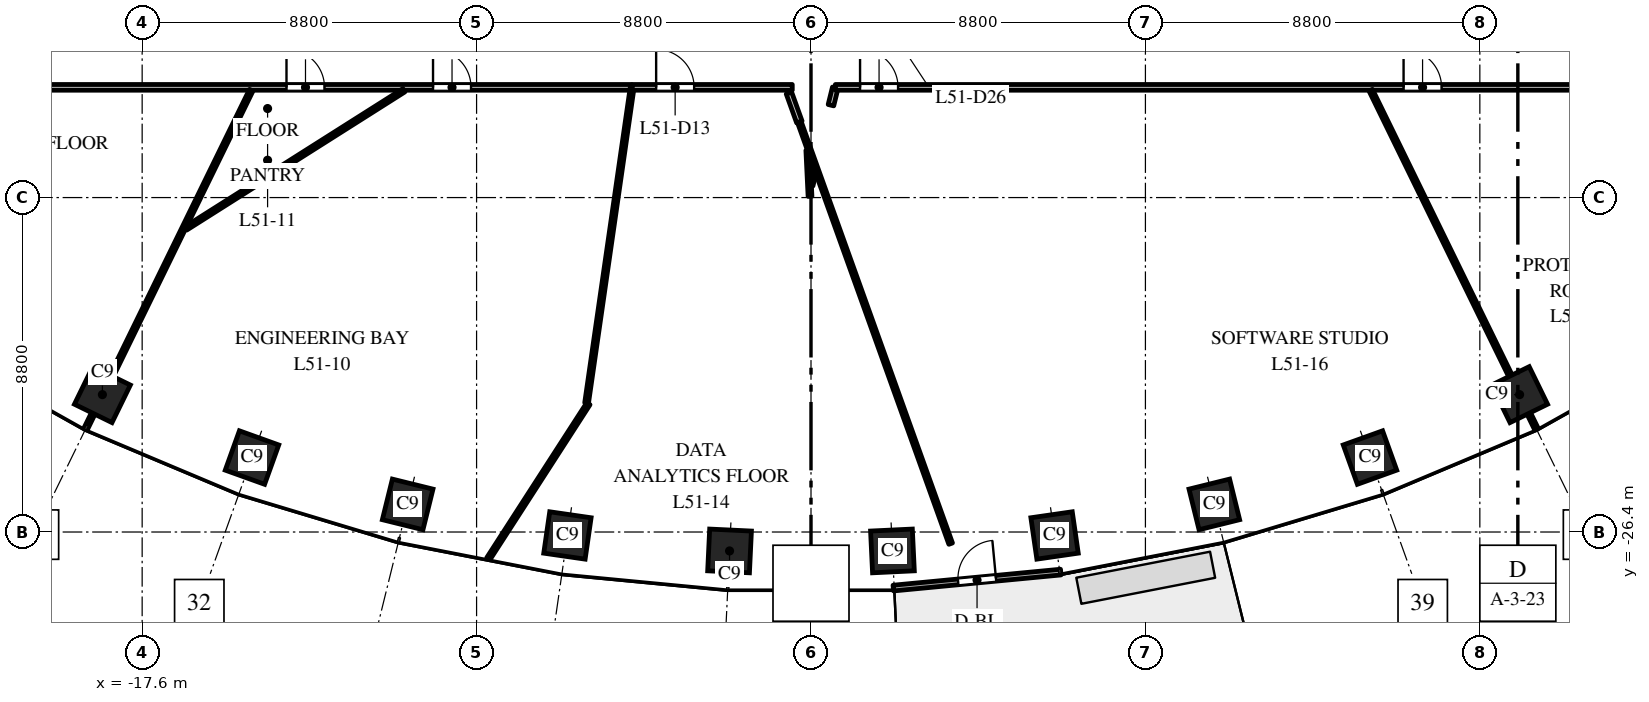
"""IFC4 building model, lengths in metres.
Left out: names, types, materials, properties, quantities, classifications, styles, units other than length and angle.
Written with IfcOpenShell. Run it as: python <this file> out.ifc"""

import sys

from ifc_helpers import new_model, si_unit, direction, frame, frame_2d, origin, origin_2d, place, context, subcontext, project, spatial, rectangle, extrude, element, fill, save


model = new_model("IFC4")
c1 = context("Model", 3, precision=1e-05, world=origin(), true_north=direction((0.0, 1.0)))
c2 = subcontext(c1, "Body", "Model", "MODEL_VIEW")
j1 = project(units=[si_unit("LENGTHUNIT", "METRE"), si_unit("PLANEANGLEUNIT", "RADIAN")], contexts=[c1])
p1 = place(None, origin())
s1 = spatial("IfcSite", under=j1, at=p1, CompositionType="ELEMENT")
p2 = place(p1, origin())
s2 = spatial("IfcBuilding", under=s1, at=p2, CompositionType="ELEMENT")
p3 = place(p2, frame((0.0, 0.0, 245.5)))
s3 = spatial("IfcBuildingStorey", under=s2, at=p3, CompositionType="ELEMENT", Elevation=245.5)
for number, where, z_axis, x_axis in (
    (1, (-18.646, -22.785, 0.0), (0.0, 0.0, 1.0), (0.898, -0.439, 0.0)),
    (2, (-14.709, -24.441, 0.0), (0.0, 0.0, 1.0), (0.941, -0.338, 0.0)),
    (3, (-10.613, -25.674, 0.0), (0.0, 0.0, 1.0), (0.971, -0.24, 0.0)),
    (4, (-6.409, -26.491, 0.0), (0.0, 0.0, 1.0), (0.99, -0.143, 0.0)),
    (5, (-2.143, -26.898, 0.0), (0.0, 0.0, 1.0), (0.999, -0.048, 0.0)),
    (6, (2.143, -26.898, 0.0), (0.0, 0.0, 1.0), (0.999, 0.048, 0.0)),
    (7, (6.409, -26.491, 0.0), (0.0, 0.0, 1.0), (0.99, 0.143, 0.0)),
    (8, (10.613, -25.674, 0.0), (0.0, 0.0, 1.0), (0.971, 0.24, 0.0)),
    (9, (14.709, -24.441, 0.0), (0.0, 0.0, 1.0), (0.941, 0.338, 0.0)),
    (10, (18.646, -22.785, 0.0), (0.0, 0.0, 1.0), (0.898, 0.439, 0.0)),
):
    element("IfcColumn", number, at=place(p3, frame(where, z_axis=z_axis, x_axis=x_axis)), inside=s3, PredefinedType="COLUMN", context=c2, shape_type="SweptSolid", body=[
        extrude(rectangle(XDim=1.1, YDim=1.1, at=origin_2d()), origin(), (0.0, 0.0, 1.0), 4.0),
    ])
p4 = place(p3, frame((2.166, -27.875, 0.0), z_axis=(0.0, 0.0, 1.0), x_axis=(0.995473879823, 0.095035543824, 0.0)))
e11 = element("IfcWall", 11, at=p4, inside=s3, PredefinedType="STANDARD", context=c2, shape_type="SweptSolid", body=[
    extrude(rectangle(XDim=4.426, YDim=0.15, at=frame_2d((2.213, 0.0))), origin(), (0.0, 0.0, 1.0), 3.7),
])
p5 = place(p4, frame((1.713, 0.0, 0.0)))
e12 = element("IfcOpeningElement", 12, at=p5, cuts=e11, PredefinedType="OPENING", context=c2, shape_type="SweptSolid", body=[
    extrude(rectangle(XDim=1.0, YDim=2.4, at=frame_2d((0.5, 1.2))), frame((0.0, 0.085, 0.0), z_axis=(0.0, -1.0, 0.0), x_axis=(1.0, 0.0, 0.0)), (0.0, 0.0, 1.0), 0.17),
])
p6 = place(p3, frame((-26.0, -14.7, 0.0), z_axis=(0.0, 0.0, 1.0), x_axis=(1.0, 0.0, 0.0)))
e13 = element("IfcWall", 13, at=p6, inside=s3, PredefinedType="PARTITIONING", context=c2, shape_type="SweptSolid", body=[
    extrude(rectangle(XDim=21.275, YDim=0.15, at=frame_2d((10.637, 0.0))), origin(), (0.0, 0.0, 1.0), 2.75),
])
p7 = place(p6, frame((16.054, 0.0, 0.0)))
e14 = element("IfcOpeningElement", 14, at=p7, cuts=e13, PredefinedType="OPENING", context=c2, shape_type="SweptSolid", body=[
    extrude(rectangle(XDim=1.0, YDim=2.1, at=frame_2d((0.5, 1.05))), frame((0.0, 0.085, 0.0), z_axis=(0.0, -1.0, 0.0), x_axis=(1.0, 0.0, 0.0)), (0.0, 0.0, 1.0), 0.17),
])
p8 = place(p6, frame((12.198, 0.0, 0.0)))
e15 = element("IfcOpeningElement", 15, at=p8, cuts=e13, PredefinedType="OPENING", context=c2, shape_type="SweptSolid", body=[
    extrude(rectangle(XDim=1.0, YDim=2.1, at=frame_2d((0.5, 1.05))), frame((0.0, 0.085, 0.0), z_axis=(0.0, -1.0, 0.0), x_axis=(1.0, 0.0, 0.0)), (0.0, 0.0, 1.0), 0.17),
])
p9 = place(p3, frame((-19.086, -23.685, 0.0), z_axis=(0.0, 0.0, 1.0), x_axis=(0.439200418971, 0.898389109448, 0.0)))
e16 = element("IfcWall", 16, at=p9, inside=s3, PredefinedType="PARTITIONING", context=c2, shape_type="SweptSolid", body=[
    extrude(rectangle(XDim=9.918, YDim=0.1, at=frame_2d((4.959, 0.0))), origin(), (0.0, 0.0, 1.0), 2.85),
])
p10 = place(p3, frame((-16.452, -18.412, 0.0), z_axis=(0.0, 0.0, 1.0), x_axis=(0.84484019065, 0.535018740104, 0.0)))
e17 = element("IfcWall", 17, at=p10, inside=s3, PredefinedType="PARTITIONING", context=c2, shape_type="SweptSolid", body=[
    extrude(rectangle(XDim=6.794, YDim=0.1, at=frame_2d((3.397, 0.0))), origin(), (0.0, 0.0, 1.0), 2.85),
])
p11 = place(p3, frame((-8.491, -27.104, 0.0), z_axis=(0.0, 0.0, 1.0), x_axis=(0.542285995048, 0.840193965448, 0.0)))
e18 = element("IfcWall", 18, at=p11, inside=s3, PredefinedType="PARTITIONING", context=c2, shape_type="SweptSolid", body=[
    extrude(rectangle(XDim=4.857, YDim=0.1, at=frame_2d((2.429, 0.0))), origin(), (0.0, 0.0, 1.0), 3.0),
])
p12 = place(p3, frame((-5.905, -23.005, 0.0), z_axis=(0.0, 0.0, 1.0), x_axis=(0.142957594351, 0.989728814483, 0.0)))
e19 = element("IfcWall", 19, at=p12, inside=s3, PredefinedType="PARTITIONING", context=c2, shape_type="SweptSolid", body=[
    extrude(rectangle(XDim=8.387, YDim=0.1, at=frame_2d((4.193, 0.0))), origin(), (0.0, 0.0, 1.0), 3.7),
])
p13 = place(p3, frame((-4.705, -14.7, 0.0), z_axis=(0.0, 0.0, 1.0), x_axis=(1.0, 0.0, 0.0)))
e20 = element("IfcWall", 20, at=p13, inside=s3, PredefinedType="PARTITIONING", context=c2, shape_type="SweptSolid", body=[
    extrude(rectangle(XDim=4.212, YDim=0.15, at=frame_2d((2.106, 0.0))), origin(), (0.0, 0.0, 1.0), 2.85),
])
p14 = place(p13, frame((0.63, 0.0, 0.0)))
e21 = element("IfcOpeningElement", 21, at=p14, cuts=e20, PredefinedType="OPENING", context=c2, shape_type="SweptSolid", body=[
    extrude(rectangle(XDim=1.0, YDim=2.1, at=frame_2d((0.5, 1.05))), frame((0.0, 0.085, 0.0), z_axis=(0.0, -1.0, 0.0), x_axis=(1.0, 0.0, 0.0)), (0.0, 0.0, 1.0), 0.17),
])
p15 = place(p3, frame((-0.581, -14.848, 0.0), z_axis=(0.0, 0.0, 1.0), x_axis=(0.338772689559, -0.940868250505, 0.0)))
e22 = element("IfcWall", 22, at=p15, inside=s3, PredefinedType="PARTITIONING", context=c2, shape_type="SweptSolid", body=[
    extrude(rectangle(XDim=0.812, YDim=0.15, at=frame_2d((0.406, 0.0))), origin(), (0.0, 0.0, 1.0), 3.7),
])
p16 = place(p3, frame((-0.307, -15.612, 0.0), z_axis=(0.0, 0.0, 1.0), x_axis=(0.337825233783, -0.941208856428, 0.0)))
e23 = element("IfcWall", 23, at=p16, inside=s3, PredefinedType="PARTITIONING", context=c2, shape_type="SweptSolid", body=[
    extrude(rectangle(XDim=11.787, YDim=0.1, at=frame_2d((5.894, 0.0))), origin(), (0.0, 0.0, 1.0), 3.0),
])
p17 = place(p3, frame((-0.084, -16.356, 0.0), z_axis=(0.0, 0.0, 1.0), x_axis=(0.047967320325, -0.998848905581, 0.0)))
e24 = element("IfcWall", 24, at=p17, inside=s3, PredefinedType="PARTITIONING", context=c2, shape_type="SweptSolid", body=[
    extrude(rectangle(XDim=1.211, YDim=0.1, at=frame_2d((0.606, 0.0))), origin(), (0.0, 0.0, 1.0), 3.7),
])
p18 = place(p3, frame((0.002, -17.284, 0.0), z_axis=(0.0, 0.0, 1.0), x_axis=(0.240121592304, 0.970742819139, 0.0)))
e25 = element("IfcWall", 25, at=p18, inside=s3, PredefinedType="PARTITIONING", context=c2, shape_type="SweptSolid", body=[
    extrude(rectangle(XDim=0.405, YDim=0.1, at=frame_2d((0.202, 0.0))), origin(), (0.0, 0.0, 1.0), 3.7),
])
p19 = place(p3, frame((0.525, -15.169, 0.0), z_axis=(0.0, 0.0, 1.0), x_axis=(0.239131424565, 0.970987209898, 0.0)))
e26 = element("IfcWall", 26, at=p19, inside=s3, PredefinedType="PARTITIONING", context=c2, shape_type="SweptSolid", body=[
    extrude(rectangle(XDim=0.473, YDim=0.15, at=frame_2d((0.236, 0.0))), origin(), (0.0, 0.0, 1.0), 3.7),
])
p20 = place(p3, frame((0.641, -14.7, 0.0), z_axis=(0.0, 0.0, 1.0), x_axis=(1.0, 0.0, 0.0)))
e27 = element("IfcWall", 27, at=p20, inside=s3, PredefinedType="PARTITIONING", context=c2, shape_type="SweptSolid", body=[
    extrude(rectangle(XDim=25.359, YDim=0.15, at=frame_2d((12.679, 0.0))), origin(), (0.0, 0.0, 1.0), 2.85),
])
p21 = place(p20, frame((0.65, 0.0, 0.0)))
e28 = element("IfcOpeningElement", 28, at=p21, cuts=e27, PredefinedType="OPENING", context=c2, shape_type="SweptSolid", body=[
    extrude(rectangle(XDim=1.0, YDim=2.1, at=frame_2d((0.5, 1.05))), frame((0.0, 0.085, 0.0), z_axis=(0.0, -1.0, 0.0), x_axis=(1.0, 0.0, 0.0)), (0.0, 0.0, 1.0), 0.17),
])
p22 = place(p20, frame((14.952, 0.0, 0.0)))
e29 = element("IfcOpeningElement", 29, at=p22, cuts=e27, PredefinedType="OPENING", context=c2, shape_type="SweptSolid", body=[
    extrude(rectangle(XDim=1.0, YDim=2.1, at=frame_2d((0.5, 1.05))), frame((0.0, 0.085, 0.0), z_axis=(0.0, -1.0, 0.0), x_axis=(1.0, 0.0, 0.0)), (0.0, 0.0, 1.0), 0.17),
])
p23 = place(p3, frame((14.73, -14.775, 0.0), z_axis=(0.0, 0.0, 1.0), x_axis=(0.439200418971, -0.898389109448, 0.0)))
e30 = element("IfcWall", 30, at=p23, inside=s3, PredefinedType="PARTITIONING", context=c2, shape_type="SweptSolid", body=[
    extrude(rectangle(XDim=9.918, YDim=0.1, at=frame_2d((4.959, 0.0))), origin(), (0.0, 0.0, 1.0), 3.0),
])
p24 = place(p5, origin())
e31 = element("IfcDoor", 31, at=p24, inside=s3, OperationType="SINGLE_SWING_RIGHT", PredefinedType="DOOR", context=c2, shape_type="SweptSolid", body=[
    extrude(rectangle(XDim=1.0, YDim=2.4, at=frame_2d((0.5, 1.2))), frame((0.0, 0.025, 0.0), z_axis=(0.0, -1.0, 0.0), x_axis=(1.0, 0.0, 0.0)), (0.0, 0.0, 1.0), 0.05),
])
fill(e12, e31)
p25 = place(p7, origin())
e32 = element("IfcDoor", 32, at=p25, inside=s3, OperationType="SINGLE_SWING_LEFT", PredefinedType="DOOR", context=c2, shape_type="SweptSolid", body=[
    extrude(rectangle(XDim=1.0, YDim=2.1, at=frame_2d((0.5, 1.05))), frame((0.0, 0.025, 0.0), z_axis=(0.0, -1.0, 0.0), x_axis=(1.0, 0.0, 0.0)), (0.0, 0.0, 1.0), 0.05),
])
fill(e14, e32)
p26 = place(p8, origin())
e33 = element("IfcDoor", 33, at=p26, inside=s3, OperationType="SINGLE_SWING_LEFT", PredefinedType="DOOR", context=c2, shape_type="SweptSolid", body=[
    extrude(rectangle(XDim=1.0, YDim=2.1, at=frame_2d((0.5, 1.05))), frame((0.0, 0.025, 0.0), z_axis=(0.0, -1.0, 0.0), x_axis=(1.0, 0.0, 0.0)), (0.0, 0.0, 1.0), 0.05),
])
fill(e15, e33)
p27 = place(p14, origin())
e34 = element("IfcDoor", 34, at=p27, inside=s3, OperationType="SINGLE_SWING_LEFT", PredefinedType="DOOR", context=c2, shape_type="SweptSolid", body=[
    extrude(rectangle(XDim=1.0, YDim=2.1, at=frame_2d((0.5, 1.05))), frame((0.0, 0.025, 0.0), z_axis=(0.0, -1.0, 0.0), x_axis=(1.0, 0.0, 0.0)), (0.0, 0.0, 1.0), 0.05),
])
fill(e21, e34)
p28 = place(p21, origin())
e35 = element("IfcDoor", 35, at=p28, inside=s3, OperationType="SINGLE_SWING_LEFT", PredefinedType="DOOR", context=c2, shape_type="SweptSolid", body=[
    extrude(rectangle(XDim=1.0, YDim=2.1, at=frame_2d((0.5, 1.05))), frame((0.0, 0.025, 0.0), z_axis=(0.0, -1.0, 0.0), x_axis=(1.0, 0.0, 0.0)), (0.0, 0.0, 1.0), 0.05),
])
fill(e28, e35)
p29 = place(p22, origin())
e36 = element("IfcDoor", 36, at=p29, inside=s3, OperationType="SINGLE_SWING_LEFT", PredefinedType="DOOR", context=c2, shape_type="SweptSolid", body=[
    extrude(rectangle(XDim=1.0, YDim=2.1, at=frame_2d((0.5, 1.05))), frame((0.0, 0.025, 0.0), z_axis=(0.0, -1.0, 0.0), x_axis=(1.0, 0.0, 0.0)), (0.0, 0.0, 1.0), 0.05),
])
fill(e29, e36)
save(model, sys.argv[1])
